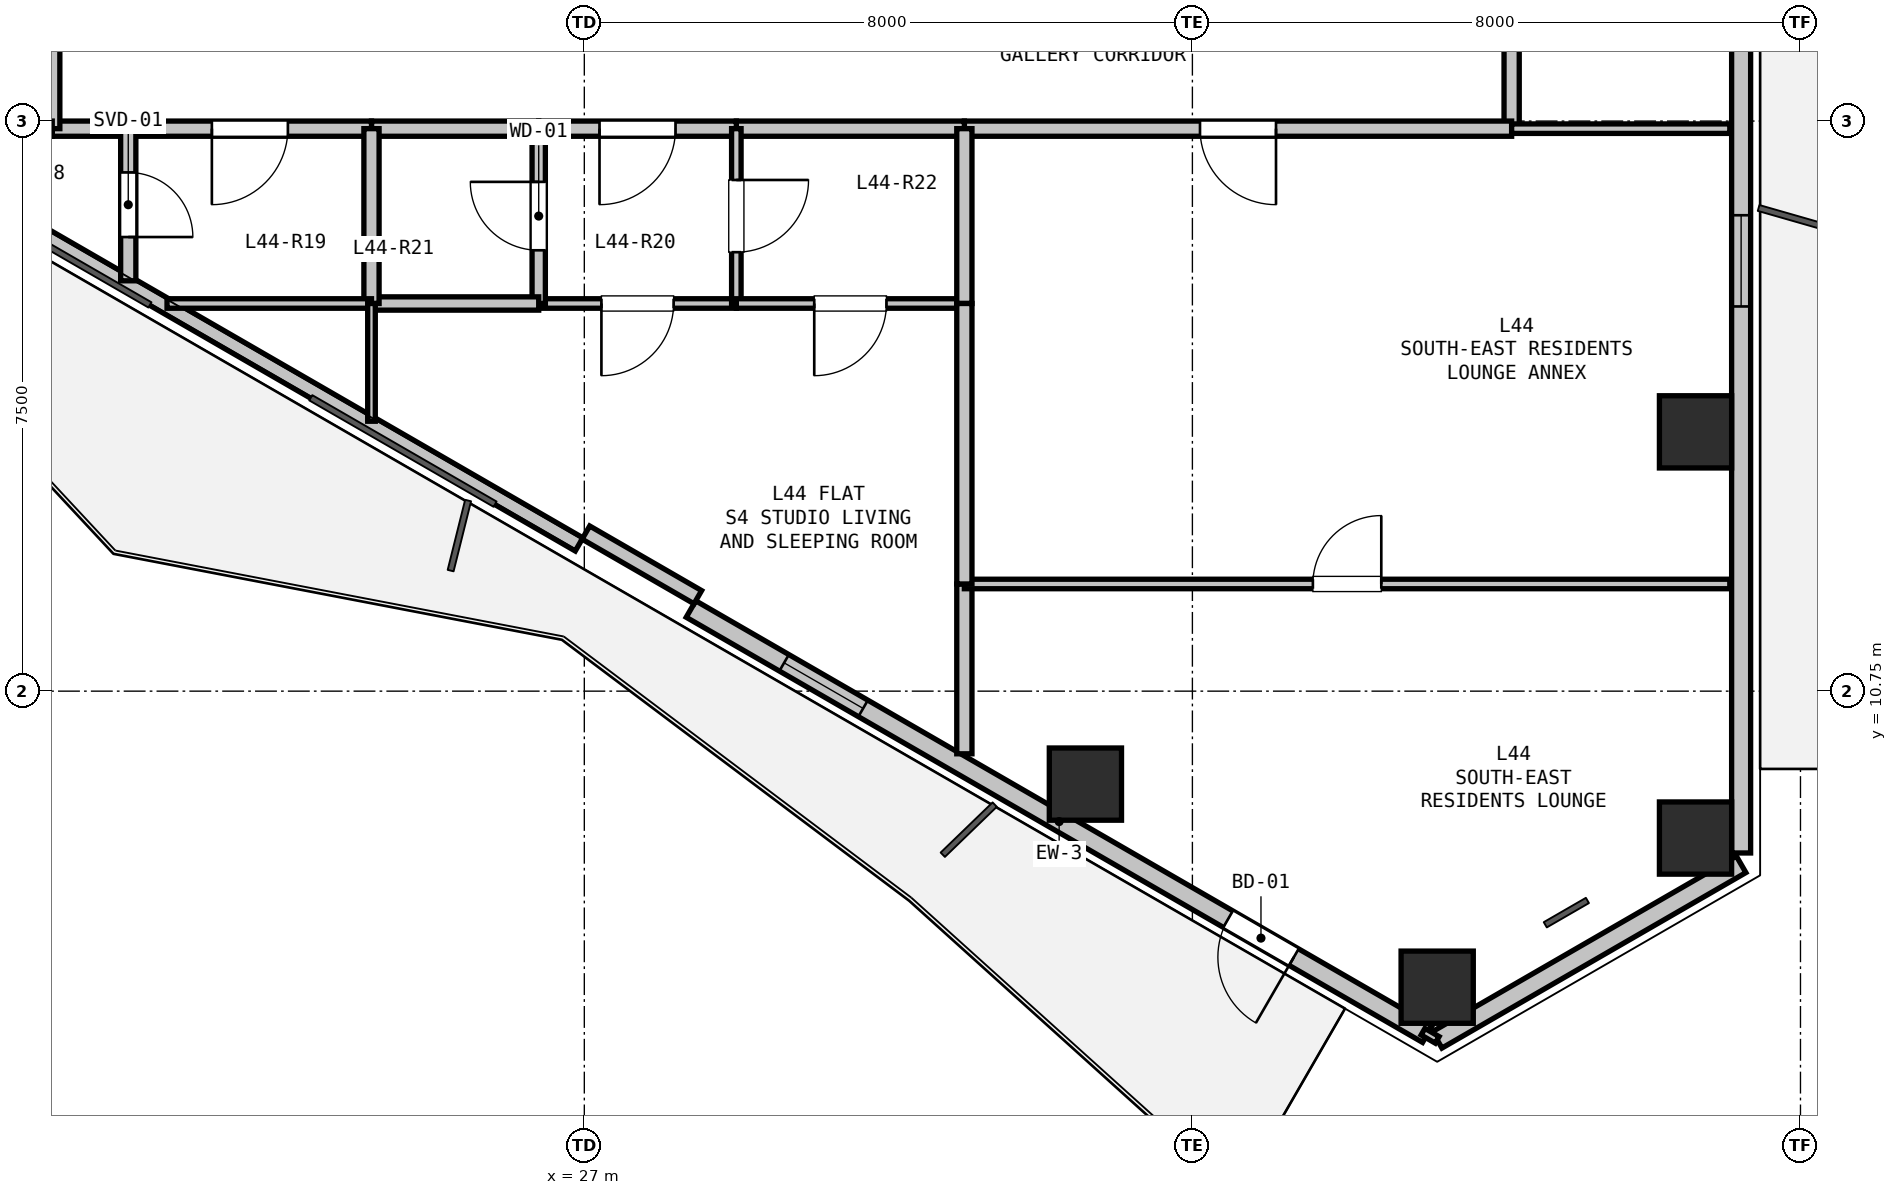
"""IFC4 building model, lengths in metres.
Left out: names, types, materials, properties, quantities, classifications, styles, units other than length and angle.
Written with IfcOpenShell. Run it as: python <this file> out.ifc"""

import sys

from ifc_helpers import new_model, si_unit, direction, frame, frame_2d, origin, origin_2d, place, context, subcontext, project, spatial, rectangle, hollow_rectangle, extrude, element, fill, save


model = new_model("IFC4")
c1 = context("Model", 3, precision=1e-05, world=origin(), true_north=direction((0.0, 1.0)))
c2 = subcontext(c1, "Body", "Model", "MODEL_VIEW")
j1 = project(units=[si_unit("LENGTHUNIT", "METRE"), si_unit("PLANEANGLEUNIT", "RADIAN")], contexts=[c1])
p1 = place(None, origin())
s1 = spatial("IfcSite", under=j1, at=p1, CompositionType="ELEMENT")
p2 = place(p1, origin())
s2 = spatial("IfcBuilding", under=s1, at=p2, CompositionType="ELEMENT")
p3 = place(p2, frame((0.0, 0.0, 157.5)))
s3 = spatial("IfcBuildingStorey", under=s2, at=p3, CompositionType="ELEMENT", Elevation=157.5)
for number, where, z_axis, x_axis in (
    (1, (41.619, 14.161, 0.0), (0.0, 0.0, 1.0), (1.0, 0.0, 0.0)),
    (2, (41.619, 8.817, 0.0), (0.0, 0.0, 1.0), (1.0, 0.0, 0.0)),
    (3, (38.22, 6.855, 0.0), (0.0, 0.0, 1.0), (1.0, 0.0, 0.0)),
    (4, (33.593, 9.527, 0.0), (0.0, 0.0, 1.0), (1.0, 0.0, 0.0)),
):
    element("IfcColumn", number, at=place(p3, frame(where, z_axis=z_axis, x_axis=x_axis)), inside=s3, PredefinedType="COLUMN", context=c2, shape_type="SweptSolid", body=[
        extrude(hollow_rectangle(XDim=0.95, YDim=0.95, WallThickness=0.028, at=origin_2d()), origin(), (0.0, 0.0, 1.0), 3.3),
    ])
p4 = place(p3, frame((42.219, 8.471, 0.0), z_axis=(0.0, 0.0, 1.0), x_axis=(-0.866035021055, -0.499983342029, 0.0)))
e5 = element("IfcWall", 5, at=p4, inside=s3, PredefinedType="SOLIDWALL", context=c2, shape_type="SweptSolid", body=[
    extrude(rectangle(XDim=4.617, YDim=0.25, at=frame_2d((2.309, 0.0))), origin(), (0.0, 0.0, 1.0), 2.6),
])
p5 = place(p3, frame((42.219, 19.807, 0.0), z_axis=(0.0, 0.0, 1.0), x_axis=(0.0, -1.0, 0.0)))
e6 = element("IfcWall", 6, at=p5, inside=s3, PredefinedType="SOLIDWALL", context=c2, shape_type="SweptSolid", body=[
    extrude(rectangle(XDim=11.186, YDim=0.25, at=frame_2d((5.593, 0.0))), origin(), (0.0, 0.0, 1.0), 2.6),
])
p6 = place(p5, frame((2.796, 0.0, 0.9)))
e7 = element("IfcOpeningElement", 7, at=p6, cuts=e6, PredefinedType="OPENING", context=c2, shape_type="SweptSolid", body=[
    extrude(rectangle(XDim=1.2, YDim=1.5, at=frame_2d((0.6, 0.75))), frame((0.0, 0.135, 0.0), z_axis=(0.0, -1.0, 0.0), x_axis=(1.0, 0.0, 0.0)), (0.0, 0.0, 1.0), 0.27),
])
p7 = place(p3, frame((38.091, 6.237, 0.0), z_axis=(0.0, 0.0, 1.0), x_axis=(-0.86602239209, 0.500005216371, 0.0)))
e8 = element("IfcWall", 8, at=p7, inside=s3, PredefinedType="SOLIDWALL", context=c2, shape_type="SweptSolid", body=[
    extrude(rectangle(XDim=11.186, YDim=0.25, at=frame_2d((5.593, 0.0))), origin(), (0.0, 0.0, 1.0), 2.6),
])
p8 = place(p7, frame((2.027, 0.0, 0.0)))
e9 = element("IfcOpeningElement", 9, at=p8, cuts=e8, PredefinedType="OPENING", context=c2, shape_type="SweptSolid", body=[
    extrude(rectangle(XDim=1.0, YDim=2.1, at=frame_2d((0.5, 1.05))), frame((0.0, 0.135, 0.0), z_axis=(0.0, -1.0, 0.0), x_axis=(1.0, 0.0, 0.0)), (0.0, 0.0, 1.0), 0.27),
])
p9 = place(p7, frame((8.571, 0.0, 0.9)))
e10 = element("IfcOpeningElement", 10, at=p9, cuts=e8, PredefinedType="OPENING", context=c2, shape_type="SweptSolid", body=[
    extrude(rectangle(XDim=1.2, YDim=1.4, at=frame_2d((0.6, 0.7))), frame((0.0, 0.135, 0.0), z_axis=(0.0, -1.0, 0.0), x_axis=(1.0, 0.0, 0.0)), (0.0, 0.0, 1.0), 0.27),
])
p10 = place(p3, frame((26.931, 12.68, 0.0), z_axis=(0.0, 0.0, 1.0), x_axis=(-0.866026619769, 0.499997893847, 0.0)))
e11 = element("IfcWall", 11, at=p10, inside=s3, PredefinedType="PARAPET", context=c2, shape_type="SweptSolid", body=[
    extrude(rectangle(XDim=10.486, YDim=0.2, at=frame_2d((5.243, 0.0))), origin(), (0.0, 0.0, 1.0), 0.2),
])
p11 = place(p3, frame((28.493, 11.986, 0.0), z_axis=(0.0, 0.0, 1.0), x_axis=(-0.86605165483, 0.499954529098, 0.0)))
e12 = element("IfcWall", 12, at=p11, inside=s3, PredefinedType="PARAPET", context=c2, shape_type="SweptSolid", body=[
    extrude(rectangle(XDim=1.7, YDim=0.2, at=frame_2d((0.85, 0.0))), origin(), (0.0, 0.0, 1.0), 2.6),
])
p12 = place(p3, frame((39.2, 19.9, 0.0), z_axis=(0.0, 0.0, 1.0), x_axis=(0.0, -1.0, 0.0)))
e13 = element("IfcWall", 13, at=p12, inside=s3, PredefinedType="PARTITIONING", context=c2, shape_type="SweptSolid", body=[
    extrude(rectangle(XDim=1.75, YDim=0.2, at=frame_2d((0.875, 0.0))), origin(), (0.0, 0.0, 1.0), 2.98),
])
p13 = place(p3, frame((39.2, 18.15, 0.0), z_axis=(0.0, 0.0, 1.0), x_axis=(-1.0, 0.0, 0.0)))
e14 = element("IfcWall", 14, at=p13, inside=s3, PredefinedType="PARTITIONING", context=c2, shape_type="SweptSolid", body=[
    extrude(rectangle(XDim=7.2, YDim=0.2, at=frame_2d((3.6, 0.0))), origin(), (0.0, 0.0, 1.0), 2.428),
])
p14 = place(p13, frame((3.1, 0.0, 0.0)))
e15 = element("IfcOpeningElement", 15, at=p14, cuts=e14, PredefinedType="OPENING", context=c2, shape_type="SweptSolid", body=[
    extrude(rectangle(XDim=1.0, YDim=2.15, at=frame_2d((0.5, 1.075))), frame((0.0, 0.11, 0.0), z_axis=(0.0, -1.0, 0.0), x_axis=(1.0, 0.0, 0.0)), (0.0, 0.0, 1.0), 0.22),
])
p15 = place(p3, frame((32.0, 18.15, 0.0), z_axis=(0.0, 0.0, 1.0), x_axis=(-1.0, 0.0, 0.0)))
e16 = element("IfcWall", 16, at=p15, inside=s3, PredefinedType="PARTITIONING", context=c2, shape_type="SweptSolid", body=[
    extrude(rectangle(XDim=3.0, YDim=0.2, at=frame_2d((1.5, 0.0))), origin(), (0.0, 0.0, 1.0), 2.98),
])
p16 = place(p3, frame((29.0, 18.15, 0.0), z_axis=(0.0, 0.0, 1.0), x_axis=(-1.0, 0.0, 0.0)))
e17 = element("IfcWall", 17, at=p16, inside=s3, PredefinedType="PARTITIONING", context=c2, shape_type="SweptSolid", body=[
    extrude(rectangle(XDim=2.6, YDim=0.2, at=frame_2d((1.3, 0.0))), origin(), (0.0, 0.0, 1.0), 2.98),
])
p17 = place(p16, frame((0.8, 0.0, 0.0)))
e18 = element("IfcOpeningElement", 18, at=p17, cuts=e17, PredefinedType="OPENING", context=c2, shape_type="SweptSolid", body=[
    extrude(rectangle(XDim=1.0, YDim=2.15, at=frame_2d((0.5, 1.075))), frame((0.0, 0.11, 0.0), z_axis=(0.0, -1.0, 0.0), x_axis=(1.0, 0.0, 0.0)), (0.0, 0.0, 1.0), 0.22),
])
p18 = place(p3, frame((26.4, 18.15, 0.0), z_axis=(0.0, 0.0, 1.0), x_axis=(-1.0, 0.0, 0.0)))
e19 = element("IfcWall", 19, at=p18, inside=s3, PredefinedType="PARTITIONING", context=c2, shape_type="SweptSolid", body=[
    extrude(rectangle(XDim=2.2, YDim=0.2, at=frame_2d((1.1, 0.0))), origin(), (0.0, 0.0, 1.0), 2.428),
])
p19 = place(p3, frame((24.2, 18.15, 0.0), z_axis=(0.0, 0.0, 1.0), x_axis=(-1.0, 0.0, 0.0)))
e20 = element("IfcWall", 20, at=p19, inside=s3, PredefinedType="PARTITIONING", context=c2, shape_type="SweptSolid", body=[
    extrude(rectangle(XDim=3.2, YDim=0.2, at=frame_2d((1.6, 0.0))), origin(), (0.0, 0.0, 1.0), 2.428),
])
p20 = place(p19, frame((1.1, 0.0, 0.0)))
e21 = element("IfcOpeningElement", 21, at=p20, cuts=e20, PredefinedType="OPENING", context=c2, shape_type="SweptSolid", body=[
    extrude(rectangle(XDim=1.0, YDim=2.15, at=frame_2d((0.5, 1.075))), frame((0.0, 0.11, 0.0), z_axis=(0.0, -1.0, 0.0), x_axis=(1.0, 0.0, 0.0)), (0.0, 0.0, 1.0), 0.22),
])
p21 = place(p3, frame((21.0, 18.15, 0.0), z_axis=(0.0, 0.0, 1.0), x_axis=(-1.0, 0.0, 0.0)))
e22 = element("IfcWall", 22, at=p21, inside=s3, PredefinedType="PARTITIONING", context=c2, shape_type="SweptSolid", body=[
    extrude(rectangle(XDim=1.0, YDim=0.2, at=frame_2d((0.5, 0.0))), origin(), (0.0, 0.0, 1.0), 2.98),
])
p22 = place(p3, frame((20.0, 18.15, 0.0), z_axis=(0.0, 0.0, 1.0), x_axis=(0.0, 1.0, 0.0)))
e23 = element("IfcWall", 23, at=p22, inside=s3, PredefinedType="PARTITIONING", context=c2, shape_type="SweptSolid", body=[
    extrude(rectangle(XDim=1.75, YDim=0.2, at=frame_2d((0.875, 0.0))), origin(), (0.0, 0.0, 1.0), 2.98),
])
p23 = place(p3, frame((29.0, 15.85, 0.0), z_axis=(0.0, 0.0, 1.0), x_axis=(-1.0, 0.0, 0.0)))
e24 = element("IfcWall", 24, at=p23, inside=s3, PredefinedType="PARTITIONING", context=c2, shape_type="SweptSolid", body=[
    extrude(rectangle(XDim=2.6, YDim=0.125, at=frame_2d((1.3, 0.0))), origin(), (0.0, 0.0, 1.0), 2.428),
])
p24 = place(p23, frame((0.825, 0.0, 0.0)))
e25 = element("IfcOpeningElement", 25, at=p24, cuts=e24, PredefinedType="OPENING", context=c2, shape_type="SweptSolid", body=[
    extrude(rectangle(XDim=0.95, YDim=2.1, at=frame_2d((0.475, 1.05))), frame((0.0, 0.073, 0.0), z_axis=(0.0, -1.0, 0.0), x_axis=(1.0, 0.0, 0.0)), (0.0, 0.0, 1.0), 0.145),
])
p25 = place(p3, frame((26.4, 15.85, 0.0), z_axis=(0.0, 0.0, 1.0), x_axis=(0.0, 1.0, 0.0)))
e26 = element("IfcWall", 26, at=p25, inside=s3, PredefinedType="PLUMBINGWALL", context=c2, shape_type="SweptSolid", body=[
    extrude(rectangle(XDim=2.3, YDim=0.175, at=frame_2d((1.15, 0.0))), origin(), (0.0, 0.0, 1.0), 2.428),
])
p26 = place(p25, frame((0.7, 0.0, 0.0)))
e27 = element("IfcOpeningElement", 27, at=p26, cuts=e26, PredefinedType="OPENING", context=c2, shape_type="SweptSolid", body=[
    extrude(rectangle(XDim=0.9, YDim=2.1, at=frame_2d((0.45, 1.05))), frame((0.0, 0.097, 0.0), z_axis=(0.0, -1.0, 0.0), x_axis=(1.0, 0.0, 0.0)), (0.0, 0.0, 1.0), 0.195),
])
p27 = place(p3, frame((29.0, 18.15, 0.0), z_axis=(0.0, 0.0, 1.0), x_axis=(0.0, -1.0, 0.0)))
e28 = element("IfcWall", 28, at=p27, inside=s3, PredefinedType="PARTITIONING", context=c2, shape_type="SweptSolid", body=[
    extrude(rectangle(XDim=2.3, YDim=0.125, at=frame_2d((1.15, 0.0))), origin(), (0.0, 0.0, 1.0), 2.98),
])
p28 = place(p27, frame((0.675, 0.0, 0.0)))
e29 = element("IfcOpeningElement", 29, at=p28, cuts=e28, PredefinedType="OPENING", context=c2, shape_type="SweptSolid", body=[
    extrude(rectangle(XDim=0.95, YDim=2.1, at=frame_2d((0.475, 1.05))), frame((0.0, 0.073, 0.0), z_axis=(0.0, -1.0, 0.0), x_axis=(1.0, 0.0, 0.0)), (0.0, 0.0, 1.0), 0.145),
])
p29 = place(p3, frame((26.4, 15.85, 0.0), z_axis=(0.0, 0.0, 1.0), x_axis=(-1.0, 0.0, 0.0)))
e30 = element("IfcWall", 30, at=p29, inside=s3, PredefinedType="PLUMBINGWALL", context=c2, shape_type="SweptSolid", body=[
    extrude(rectangle(XDim=2.2, YDim=0.175, at=frame_2d((1.1, 0.0))), origin(), (0.0, 0.0, 1.0), 2.98),
])
p30 = place(p3, frame((24.2, 15.85, 0.0), z_axis=(0.0, 0.0, 1.0), x_axis=(0.0, 1.0, 0.0)))
e31 = element("IfcWall", 31, at=p30, inside=s3, PredefinedType="PARTITIONING", context=c2, shape_type="SweptSolid", body=[
    extrude(rectangle(XDim=2.3, YDim=0.2, at=frame_2d((1.15, 0.0))), origin(), (0.0, 0.0, 1.0), 2.428),
])
p31 = place(p3, frame((32.0, 15.85, 0.0), z_axis=(0.0, 0.0, 1.0), x_axis=(-1.0, 0.0, 0.0)))
e32 = element("IfcWall", 32, at=p31, inside=s3, PredefinedType="PARTITIONING", context=c2, shape_type="SweptSolid", body=[
    extrude(rectangle(XDim=3.0, YDim=0.125, at=frame_2d((1.5, 0.0))), origin(), (0.0, 0.0, 1.0), 2.98),
])
p32 = place(p31, frame((1.025, 0.0, 0.0)))
e33 = element("IfcOpeningElement", 33, at=p32, cuts=e32, PredefinedType="OPENING", context=c2, shape_type="SweptSolid", body=[
    extrude(rectangle(XDim=0.95, YDim=2.1, at=frame_2d((0.475, 1.05))), frame((0.0, 0.073, 0.0), z_axis=(0.0, -1.0, 0.0), x_axis=(1.0, 0.0, 0.0)), (0.0, 0.0, 1.0), 0.145),
])
p33 = place(p3, frame((32.0, 18.15, 0.0), z_axis=(0.0, 0.0, 1.0), x_axis=(0.0, -1.0, 0.0)))
e34 = element("IfcWall", 34, at=p33, inside=s3, PredefinedType="PARTITIONING", context=c2, shape_type="SweptSolid", body=[
    extrude(rectangle(XDim=2.3, YDim=0.2, at=frame_2d((1.15, 0.0))), origin(), (0.0, 0.0, 1.0), 2.98),
])
p34 = place(p3, frame((32.0, 9.926, 0.0), z_axis=(0.0, 0.0, 1.0), x_axis=(0.0, 1.0, 0.0)))
e35 = element("IfcWall", 35, at=p34, inside=s3, PredefinedType="PARTITIONING", context=c2, shape_type="SweptSolid", body=[
    extrude(rectangle(XDim=2.234, YDim=0.2, at=frame_2d((1.117, 0.0))), origin(), (0.0, 0.0, 1.0), 2.365),
])
p35 = place(p3, frame((32.0, 12.16, 0.0), z_axis=(0.0, 0.0, 1.0), x_axis=(1.0, 0.0, 0.0)))
e36 = element("IfcWall", 36, at=p35, inside=s3, PredefinedType="PARTITIONING", context=c2, shape_type="SweptSolid", body=[
    extrude(rectangle(XDim=10.07, YDim=0.125, at=frame_2d((5.035, 0.0))), origin(), (0.0, 0.0, 1.0), 2.428),
])
p36 = place(p35, frame((4.585, 0.0, 0.0)))
e37 = element("IfcOpeningElement", 37, at=p36, cuts=e36, PredefinedType="OPENING", context=c2, shape_type="SweptSolid", body=[
    extrude(rectangle(XDim=0.9, YDim=2.1, at=frame_2d((0.45, 1.05))), frame((0.0, 0.073, 0.0), z_axis=(0.0, -1.0, 0.0), x_axis=(1.0, 0.0, 0.0)), (0.0, 0.0, 1.0), 0.145),
])
p37 = place(p3, frame((38.221, 6.162, 0.0), z_axis=(0.0, 0.0, 1.0), x_axis=(-0.865581379588, 0.500768285049, 0.0)))
e38 = element("IfcWall", 38, at=p37, inside=s3, PredefinedType="PARTITIONING", context=c2, shape_type="SweptSolid", body=[
    extrude(rectangle(XDim=0.216, YDim=0.1, at=frame_2d((0.108, 0.0))), origin(), (0.0, 0.0, 1.0), 2.98),
])
p38 = place(p3, frame((39.2, 18.15, 0.0), z_axis=(0.0, 0.0, 1.0), x_axis=(1.0, 0.0, 0.0)))
e39 = element("IfcWall", 39, at=p38, inside=s3, PredefinedType="PARTITIONING", context=c2, shape_type="SweptSolid", body=[
    extrude(rectangle(XDim=2.87, YDim=0.125, at=frame_2d((1.435, 0.0))), origin(), (0.0, 0.0, 1.0), 2.365),
])
p39 = place(p3, frame((32.0, 12.16, 0.0), z_axis=(0.0, 0.0, 1.0), x_axis=(0.0, 1.0, 0.0)))
e40 = element("IfcWall", 40, at=p39, inside=s3, PredefinedType="PARTITIONING", context=c2, shape_type="SweptSolid", body=[
    extrude(rectangle(XDim=3.69, YDim=0.2, at=frame_2d((1.845, 0.0))), origin(), (0.0, 0.0, 1.0), 2.98),
])
p40 = place(p3, frame((21.0, 18.15, 0.0), z_axis=(0.0, 0.0, 1.0), x_axis=(0.0, -1.0, 0.0)))
e41 = element("IfcWall", 41, at=p40, inside=s3, PredefinedType="PARTITIONING", context=c2, shape_type="SweptSolid", body=[
    extrude(rectangle(XDim=2.001, YDim=0.2, at=frame_2d((1.001, 0.0))), origin(), (0.0, 0.0, 1.0), 2.365),
])
p41 = place(p40, frame((0.576, 0.0, 0.0)))
e42 = element("IfcOpeningElement", 42, at=p41, cuts=e41, PredefinedType="OPENING", context=c2, shape_type="SweptSolid", body=[
    extrude(rectangle(XDim=0.85, YDim=2.1, at=frame_2d((0.425, 1.05))), frame((0.0, 0.11, 0.0), z_axis=(0.0, -1.0, 0.0), x_axis=(1.0, 0.0, 0.0)), (0.0, 0.0, 1.0), 0.22),
])
p42 = place(p3, frame((24.2, 15.85, 0.0), z_axis=(0.0, 0.0, 1.0), x_axis=(-1.0, 0.0, 0.0)))
e43 = element("IfcWall", 43, at=p42, inside=s3, PredefinedType="PARTITIONING", context=c2, shape_type="SweptSolid", body=[
    extrude(rectangle(XDim=2.69, YDim=0.125, at=frame_2d((1.345, 0.0))), origin(), (0.0, 0.0, 1.0), 2.365),
])
p43 = place(p3, frame((24.2, 14.301, 0.0), z_axis=(0.0, 0.0, 1.0), x_axis=(0.0, 1.0, 0.0)))
e44 = element("IfcWall", 44, at=p43, inside=s3, PredefinedType="PARTITIONING", context=c2, shape_type="SweptSolid", body=[
    extrude(rectangle(XDim=1.549, YDim=0.1, at=frame_2d((0.774, 0.0))), origin(), (0.0, 0.0, 1.0), 2.365),
])
p44 = place(p6, origin())
e45 = element("IfcWindow", 45, at=p44, inside=s3, PartitioningType="SINGLE_PANEL", PredefinedType="WINDOW", context=c2, shape_type="SweptSolid", body=[
    extrude(rectangle(XDim=1.2, YDim=1.5, at=frame_2d((0.6, 0.75))), frame((0.0, 0.03, 0.0), z_axis=(0.0, -1.0, 0.0), x_axis=(1.0, 0.0, 0.0)), (0.0, 0.0, 1.0), 0.06),
])
fill(e7, e45)
p45 = place(p8, origin())
e46 = element("IfcDoor", 46, at=p45, inside=s3, OperationType="SINGLE_SWING_LEFT", PredefinedType="DOOR", context=c2, shape_type="SweptSolid", body=[
    extrude(rectangle(XDim=1.0, YDim=2.1, at=frame_2d((0.5, 1.05))), frame((0.0, 0.025, 0.0), z_axis=(0.0, -1.0, 0.0), x_axis=(1.0, 0.0, 0.0)), (0.0, 0.0, 1.0), 0.05),
])
fill(e9, e46)
p46 = place(p9, origin())
e47 = element("IfcWindow", 47, at=p46, inside=s3, PartitioningType="SINGLE_PANEL", PredefinedType="WINDOW", context=c2, shape_type="SweptSolid", body=[
    extrude(rectangle(XDim=1.2, YDim=1.4, at=frame_2d((0.6, 0.7))), frame((0.0, 0.03, 0.0), z_axis=(0.0, -1.0, 0.0), x_axis=(1.0, 0.0, 0.0)), (0.0, 0.0, 1.0), 0.06),
])
fill(e10, e47)
p47 = place(p17, origin())
e48 = element("IfcDoor", 48, at=p47, inside=s3, OperationType="SINGLE_SWING_RIGHT", PredefinedType="DOOR", context=c2, shape_type="SweptSolid", body=[
    extrude(rectangle(XDim=1.0, YDim=2.15, at=frame_2d((0.5, 1.075))), frame((0.0, 0.025, 0.0), z_axis=(0.0, -1.0, 0.0), x_axis=(1.0, 0.0, 0.0)), (0.0, 0.0, 1.0), 0.05),
])
fill(e18, e48)
p48 = place(p14, origin())
e49 = element("IfcDoor", 49, at=p48, inside=s3, OperationType="SINGLE_SWING_LEFT", PredefinedType="DOOR", context=c2, shape_type="SweptSolid", body=[
    extrude(rectangle(XDim=1.0, YDim=2.15, at=frame_2d((0.5, 1.075))), frame((0.0, 0.025, 0.0), z_axis=(0.0, -1.0, 0.0), x_axis=(1.0, 0.0, 0.0)), (0.0, 0.0, 1.0), 0.05),
])
fill(e15, e49)
p49 = place(p20, origin())
e50 = element("IfcDoor", 50, at=p49, inside=s3, OperationType="SINGLE_SWING_RIGHT", PredefinedType="DOOR", context=c2, shape_type="SweptSolid", body=[
    extrude(rectangle(XDim=1.0, YDim=2.15, at=frame_2d((0.5, 1.075))), frame((0.0, 0.025, 0.0), z_axis=(0.0, -1.0, 0.0), x_axis=(1.0, 0.0, 0.0)), (0.0, 0.0, 1.0), 0.05),
])
fill(e21, e50)
p50 = place(p26, origin())
e51 = element("IfcDoor", 51, at=p50, inside=s3, OperationType="SINGLE_SWING_RIGHT", PredefinedType="DOOR", context=c2, shape_type="SweptSolid", body=[
    extrude(rectangle(XDim=0.9, YDim=2.1, at=frame_2d((0.45, 1.05))), frame((0.0, 0.025, 0.0), z_axis=(0.0, -1.0, 0.0), x_axis=(1.0, 0.0, 0.0)), (0.0, 0.0, 1.0), 0.05),
])
fill(e27, e51)
p51 = place(p28, origin())
e52 = element("IfcDoor", 52, at=p51, inside=s3, OperationType="SINGLE_SWING_LEFT", PredefinedType="DOOR", context=c2, shape_type="SweptSolid", body=[
    extrude(rectangle(XDim=0.95, YDim=2.1, at=frame_2d((0.475, 1.05))), frame((0.0, 0.025, 0.0), z_axis=(0.0, -1.0, 0.0), x_axis=(1.0, 0.0, 0.0)), (0.0, 0.0, 1.0), 0.05),
])
fill(e29, e52)
p52 = place(p24, origin())
e53 = element("IfcDoor", 53, at=p52, inside=s3, OperationType="SINGLE_SWING_RIGHT", PredefinedType="DOOR", context=c2, shape_type="SweptSolid", body=[
    extrude(rectangle(XDim=0.95, YDim=2.1, at=frame_2d((0.475, 1.05))), frame((0.0, 0.025, 0.0), z_axis=(0.0, -1.0, 0.0), x_axis=(1.0, 0.0, 0.0)), (0.0, 0.0, 1.0), 0.05),
])
fill(e25, e53)
p53 = place(p32, origin())
e54 = element("IfcDoor", 54, at=p53, inside=s3, OperationType="SINGLE_SWING_RIGHT", PredefinedType="DOOR", context=c2, shape_type="SweptSolid", body=[
    extrude(rectangle(XDim=0.95, YDim=2.1, at=frame_2d((0.475, 1.05))), frame((0.0, 0.025, 0.0), z_axis=(0.0, -1.0, 0.0), x_axis=(1.0, 0.0, 0.0)), (0.0, 0.0, 1.0), 0.05),
])
fill(e33, e54)
p54 = place(p36, origin())
e55 = element("IfcDoor", 55, at=p54, inside=s3, OperationType="SINGLE_SWING_RIGHT", PredefinedType="DOOR", context=c2, shape_type="SweptSolid", body=[
    extrude(rectangle(XDim=0.9, YDim=2.1, at=frame_2d((0.45, 1.05))), frame((0.0, 0.025, 0.0), z_axis=(0.0, -1.0, 0.0), x_axis=(1.0, 0.0, 0.0)), (0.0, 0.0, 1.0), 0.05),
])
fill(e37, e55)
p55 = place(p41, origin())
e56 = element("IfcDoor", 56, at=p55, inside=s3, OperationType="SINGLE_SWING_RIGHT", PredefinedType="DOOR", context=c2, shape_type="SweptSolid", body=[
    extrude(rectangle(XDim=0.85, YDim=2.1, at=frame_2d((0.425, 1.05))), frame((0.0, 0.025, 0.0), z_axis=(0.0, -1.0, 0.0), x_axis=(1.0, 0.0, 0.0)), (0.0, 0.0, 1.0), 0.05),
])
fill(e42, e56)
save(model, sys.argv[1])
